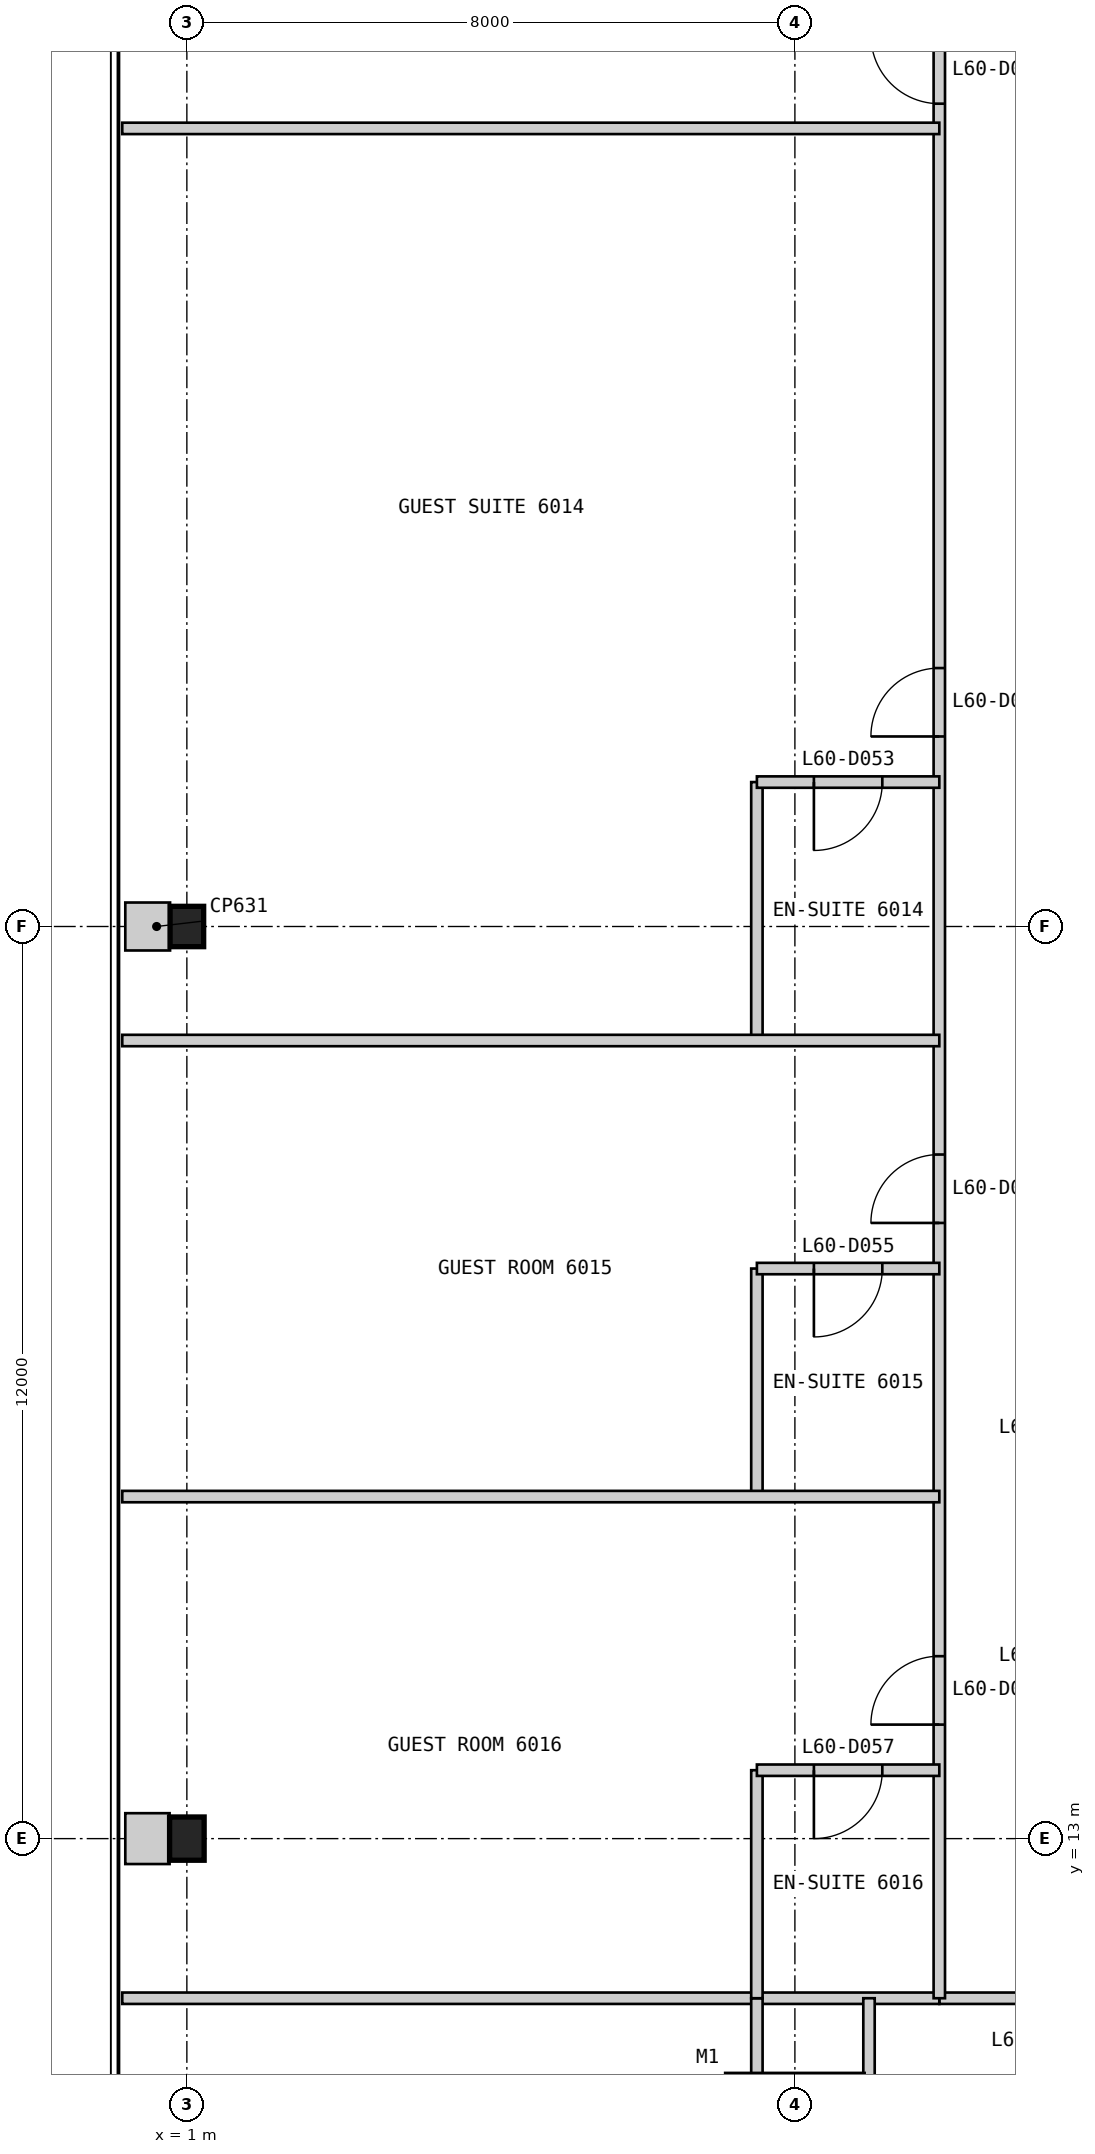
"""IFC4 building model, lengths in metres.
Left out: names, types, materials, properties, quantities, classifications, styles, units other than length and angle.
Written with IfcOpenShell. Run it as: python <this file> out.ifc"""

import sys

from ifc_helpers import new_model, si_unit, direction, frame, frame_2d, origin, origin_2d, place, context, subcontext, project, spatial, rectangle, i_section, extrude, element, fill, save


model = new_model("IFC4")
c1 = context("Model", 3, precision=1e-05, world=origin(), true_north=direction((0.0, 1.0)))
c2 = subcontext(c1, "Body", "Model", "MODEL_VIEW")
j1 = project(units=[si_unit("LENGTHUNIT", "METRE"), si_unit("PLANEANGLEUNIT", "RADIAN")], contexts=[c1])
p1 = place(None, origin())
s1 = spatial("IfcSite", under=j1, at=p1, CompositionType="ELEMENT")
p2 = place(p1, origin())
s2 = spatial("IfcBuilding", under=s1, at=p2, CompositionType="ELEMENT")
p3 = place(p2, frame((0.0, 0.0, 256.0)))
s3 = spatial("IfcBuildingStorey", under=s2, at=p3, CompositionType="ELEMENT", Elevation=256.0)
p4 = place(p3, frame((9.0, 9.0, 0.0), z_axis=(0.0, 0.0, 1.0), x_axis=(1.0, 0.0, 0.0)))
e1 = element("IfcColumn", 1, at=p4, inside=s3, PredefinedType="COLUMN", context=c2, shape_type="SweptSolid", body=[
    extrude(rectangle(XDim=1.8, YDim=1.8, at=origin_2d()), origin(), (0.0, 0.0, 1.0), 3.4),
])
p5 = place(p3, frame((1.0, 25.0, 0.0), z_axis=(0.0, 0.0, 1.0), x_axis=(1.0, 0.0, 0.0)))
e2 = element("IfcColumn", 2, at=p5, inside=s3, PredefinedType="COLUMN", context=c2, shape_type="SweptSolid", body=[
    extrude(i_section(OverallWidth=0.442, OverallDepth=0.531, WebThickness=0.066, FlangeThickness=0.106, at=origin_2d()), origin(), (0.0, 0.0, 1.0), 3.4),
])
p6 = place(p3, frame((1.0, 13.0, 0.0), z_axis=(0.0, 0.0, 1.0), x_axis=(1.0, 0.0, 0.0)))
e3 = element("IfcColumn", 3, at=p6, inside=s3, PredefinedType="COLUMN", context=c2, shape_type="SweptSolid", body=[
    extrude(i_section(OverallWidth=0.455, OverallDepth=0.569, WebThickness=0.078, FlangeThickness=0.125, at=origin_2d()), origin(), (0.0, 0.0, 1.0), 3.4),
])
p7 = place(p3, frame((10.9, 10.9, 0.0), z_axis=(0.0, 0.0, 1.0), x_axis=(1.0, 0.0, 0.0)))
e4 = element("IfcWall", 4, at=p7, inside=s3, PredefinedType="PARTITIONING", context=c2, shape_type="SweptSolid", body=[
    extrude(rectangle(XDim=28.2, YDim=0.15, at=frame_2d((14.1, 0.0))), origin(), (0.0, 0.0, 1.0), 3.25),
])
p8 = place(p7, frame((2.375, 0.0, 0.0)))
e5 = element("IfcOpeningElement", 5, at=p8, cuts=e4, PredefinedType="OPENING", context=c2, shape_type="SweptSolid", body=[
    extrude(rectangle(XDim=0.9, YDim=2.1, at=frame_2d((0.45, 1.05))), frame((0.0, 0.085, 0.0), z_axis=(0.0, -1.0, 0.0), x_axis=(1.0, 0.0, 0.0)), (0.0, 0.0, 1.0), 0.17),
])
p9 = place(p7, frame((10.7, 0.0, 0.0)))
e6 = element("IfcOpeningElement", 6, at=p9, cuts=e4, PredefinedType="OPENING", context=c2, shape_type="SweptSolid", body=[
    extrude(rectangle(XDim=0.9, YDim=2.1, at=frame_2d((0.45, 1.05))), frame((0.0, 0.085, 0.0), z_axis=(0.0, -1.0, 0.0), x_axis=(1.0, 0.0, 0.0)), (0.0, 0.0, 1.0), 0.17),
])
p10 = place(p7, frame((16.8, 0.0, 0.0)))
e7 = element("IfcOpeningElement", 7, at=p10, cuts=e4, PredefinedType="OPENING", context=c2, shape_type="SweptSolid", body=[
    extrude(rectangle(XDim=1.0, YDim=2.1, at=frame_2d((0.5, 1.05))), frame((0.0, 0.085, 0.0), z_axis=(0.0, -1.0, 0.0), x_axis=(1.0, 0.0, 0.0)), (0.0, 0.0, 1.0), 0.17),
])
p11 = place(p7, frame((23.7, 0.0, 0.0)))
e8 = element("IfcOpeningElement", 8, at=p11, cuts=e4, PredefinedType="OPENING", context=c2, shape_type="SweptSolid", body=[
    extrude(rectangle(XDim=0.9, YDim=2.1, at=frame_2d((0.45, 1.05))), frame((0.0, 0.085, 0.0), z_axis=(0.0, -1.0, 0.0), x_axis=(1.0, 0.0, 0.0)), (0.0, 0.0, 1.0), 0.17),
])
p12 = place(p3, frame((0.15, 10.9, 0.0), z_axis=(0.0, 0.0, 1.0), x_axis=(1.0, 0.0, 0.0)))
e9 = element("IfcWall", 9, at=p12, inside=s3, PredefinedType="PARTITIONING", context=c2, shape_type="SweptSolid", body=[
    extrude(rectangle(XDim=10.75, YDim=0.15, at=frame_2d((5.375, 0.0))), origin(), (0.0, 0.0, 1.0), 3.25),
])
p13 = place(p3, frame((9.975, 8.5, 0.0), z_axis=(0.0, 0.0, 1.0), x_axis=(0.0, 1.0, 0.0)))
e10 = element("IfcWall", 10, at=p13, inside=s3, PredefinedType="PARTITIONING", context=c2, shape_type="SweptSolid", body=[
    extrude(rectangle(XDim=2.4, YDim=0.15, at=frame_2d((1.2, 0.0))), origin(), (0.0, 0.0, 1.0), 3.25),
])
p14 = place(p3, frame((8.5, 0.15, 0.0), z_axis=(0.0, 0.0, 1.0), x_axis=(0.0, 1.0, 0.0)))
e11 = element("IfcWall", 11, at=p14, inside=s3, PredefinedType="PARTITIONING", context=c2, shape_type="SweptSolid", body=[
    extrude(rectangle(XDim=10.75, YDim=0.15, at=frame_2d((5.375, 0.0))), origin(), (0.0, 0.0, 1.0), 3.25),
])
p15 = place(p14, frame((5.0, 0.0, 0.0)))
e12 = element("IfcOpeningElement", 12, at=p15, cuts=e11, PredefinedType="OPENING", context=c2, shape_type="SweptSolid", body=[
    extrude(rectangle(XDim=0.9, YDim=2.1, at=frame_2d((0.45, 1.05))), frame((0.0, 0.085, 0.0), z_axis=(0.0, -1.0, 0.0), x_axis=(1.0, 0.0, 0.0)), (0.0, 0.0, 1.0), 0.17),
])
p16 = place(p3, frame((10.9, 39.1, 0.0), z_axis=(0.0, 0.0, 1.0), x_axis=(0.0, -1.0, 0.0)))
e13 = element("IfcWall", 13, at=p16, inside=s3, PredefinedType="PARTITIONING", context=c2, shape_type="SweptSolid", body=[
    extrude(rectangle(XDim=28.2, YDim=0.15, at=frame_2d((14.1, 0.0))), origin(), (0.0, 0.0, 1.0), 3.25),
])
p17 = place(p16, frame((2.375, 0.0, 0.0)))
e14 = element("IfcOpeningElement", 14, at=p17, cuts=e13, PredefinedType="OPENING", context=c2, shape_type="SweptSolid", body=[
    extrude(rectangle(XDim=0.9, YDim=2.1, at=frame_2d((0.45, 1.05))), frame((0.0, 0.085, 0.0), z_axis=(0.0, -1.0, 0.0), x_axis=(1.0, 0.0, 0.0)), (0.0, 0.0, 1.0), 0.17),
])
p18 = place(p16, frame((10.7, 0.0, 0.0)))
e15 = element("IfcOpeningElement", 15, at=p18, cuts=e13, PredefinedType="OPENING", context=c2, shape_type="SweptSolid", body=[
    extrude(rectangle(XDim=0.9, YDim=2.1, at=frame_2d((0.45, 1.05))), frame((0.0, 0.085, 0.0), z_axis=(0.0, -1.0, 0.0), x_axis=(1.0, 0.0, 0.0)), (0.0, 0.0, 1.0), 0.17),
])
p19 = place(p16, frame((17.1, 0.0, 0.0)))
e16 = element("IfcOpeningElement", 16, at=p19, cuts=e13, PredefinedType="OPENING", context=c2, shape_type="SweptSolid", body=[
    extrude(rectangle(XDim=0.9, YDim=2.1, at=frame_2d((0.45, 1.05))), frame((0.0, 0.085, 0.0), z_axis=(0.0, -1.0, 0.0), x_axis=(1.0, 0.0, 0.0)), (0.0, 0.0, 1.0), 0.17),
])
p20 = place(p16, frame((23.7, 0.0, 0.0)))
e17 = element("IfcOpeningElement", 17, at=p20, cuts=e13, PredefinedType="OPENING", context=c2, shape_type="SweptSolid", body=[
    extrude(rectangle(XDim=0.9, YDim=2.1, at=frame_2d((0.45, 1.05))), frame((0.0, 0.085, 0.0), z_axis=(0.0, -1.0, 0.0), x_axis=(1.0, 0.0, 0.0)), (0.0, 0.0, 1.0), 0.17),
])
p21 = place(p3, frame((0.15, 35.5, 0.0), z_axis=(0.0, 0.0, 1.0), x_axis=(1.0, 0.0, 0.0)))
e18 = element("IfcWall", 18, at=p21, inside=s3, PredefinedType="PARTITIONING", context=c2, shape_type="SweptSolid", body=[
    extrude(rectangle(XDim=10.75, YDim=0.15, at=frame_2d((5.375, 0.0))), origin(), (0.0, 0.0, 1.0), 3.25),
])
p22 = place(p3, frame((8.5, 26.9, 0.0), z_axis=(0.0, 0.0, 1.0), x_axis=(0.0, -1.0, 0.0)))
e19 = element("IfcWall", 19, at=p22, inside=s3, PredefinedType="PARTITIONING", context=c2, shape_type="SweptSolid", body=[
    extrude(rectangle(XDim=3.4, YDim=0.15, at=frame_2d((1.7, 0.0))), origin(), (0.0, 0.0, 1.0), 3.25),
])
p23 = place(p3, frame((8.5, 26.9, 0.0), z_axis=(0.0, 0.0, 1.0), x_axis=(1.0, 0.0, 0.0)))
e20 = element("IfcWall", 20, at=p23, inside=s3, PredefinedType="PARTITIONING", context=c2, shape_type="SweptSolid", body=[
    extrude(rectangle(XDim=2.4, YDim=0.15, at=frame_2d((1.2, 0.0))), origin(), (0.0, 0.0, 1.0), 3.25),
])
p24 = place(p23, frame((0.75, 0.0, 0.0)))
e21 = element("IfcOpeningElement", 21, at=p24, cuts=e20, PredefinedType="OPENING", context=c2, shape_type="SweptSolid", body=[
    extrude(rectangle(XDim=0.9, YDim=2.1, at=frame_2d((0.45, 1.05))), frame((0.0, 0.085, 0.0), z_axis=(0.0, -1.0, 0.0), x_axis=(1.0, 0.0, 0.0)), (0.0, 0.0, 1.0), 0.17),
])
p25 = place(p3, frame((0.15, 23.5, 0.0), z_axis=(0.0, 0.0, 1.0), x_axis=(1.0, 0.0, 0.0)))
e22 = element("IfcWall", 22, at=p25, inside=s3, PredefinedType="PARTITIONING", context=c2, shape_type="SweptSolid", body=[
    extrude(rectangle(XDim=10.75, YDim=0.15, at=frame_2d((5.375, 0.0))), origin(), (0.0, 0.0, 1.0), 3.25),
])
p26 = place(p3, frame((8.5, 20.5, 0.0), z_axis=(0.0, 0.0, 1.0), x_axis=(0.0, -1.0, 0.0)))
e23 = element("IfcWall", 23, at=p26, inside=s3, PredefinedType="PARTITIONING", context=c2, shape_type="SweptSolid", body=[
    extrude(rectangle(XDim=3.0, YDim=0.15, at=frame_2d((1.5, 0.0))), origin(), (0.0, 0.0, 1.0), 3.25),
])
p27 = place(p3, frame((8.5, 20.5, 0.0), z_axis=(0.0, 0.0, 1.0), x_axis=(1.0, 0.0, 0.0)))
e24 = element("IfcWall", 24, at=p27, inside=s3, PredefinedType="PARTITIONING", context=c2, shape_type="SweptSolid", body=[
    extrude(rectangle(XDim=2.4, YDim=0.15, at=frame_2d((1.2, 0.0))), origin(), (0.0, 0.0, 1.0), 3.25),
])
p28 = place(p27, frame((0.75, 0.0, 0.0)))
e25 = element("IfcOpeningElement", 25, at=p28, cuts=e24, PredefinedType="OPENING", context=c2, shape_type="SweptSolid", body=[
    extrude(rectangle(XDim=0.9, YDim=2.1, at=frame_2d((0.45, 1.05))), frame((0.0, 0.085, 0.0), z_axis=(0.0, -1.0, 0.0), x_axis=(1.0, 0.0, 0.0)), (0.0, 0.0, 1.0), 0.17),
])
p29 = place(p3, frame((0.15, 17.5, 0.0), z_axis=(0.0, 0.0, 1.0), x_axis=(1.0, 0.0, 0.0)))
e26 = element("IfcWall", 26, at=p29, inside=s3, PredefinedType="PARTITIONING", context=c2, shape_type="SweptSolid", body=[
    extrude(rectangle(XDim=10.75, YDim=0.15, at=frame_2d((5.375, 0.0))), origin(), (0.0, 0.0, 1.0), 3.25),
])
p30 = place(p3, frame((8.5, 13.9, 0.0), z_axis=(0.0, 0.0, 1.0), x_axis=(0.0, -1.0, 0.0)))
e27 = element("IfcWall", 27, at=p30, inside=s3, PredefinedType="PARTITIONING", context=c2, shape_type="SweptSolid", body=[
    extrude(rectangle(XDim=3.0, YDim=0.15, at=frame_2d((1.5, 0.0))), origin(), (0.0, 0.0, 1.0), 3.25),
])
p31 = place(p3, frame((8.5, 13.9, 0.0), z_axis=(0.0, 0.0, 1.0), x_axis=(1.0, 0.0, 0.0)))
e28 = element("IfcWall", 28, at=p31, inside=s3, PredefinedType="PARTITIONING", context=c2, shape_type="SweptSolid", body=[
    extrude(rectangle(XDim=2.4, YDim=0.15, at=frame_2d((1.2, 0.0))), origin(), (0.0, 0.0, 1.0), 3.25),
])
p32 = place(p31, frame((0.75, 0.0, 0.0)))
e29 = element("IfcOpeningElement", 29, at=p32, cuts=e28, PredefinedType="OPENING", context=c2, shape_type="SweptSolid", body=[
    extrude(rectangle(XDim=0.9, YDim=2.1, at=frame_2d((0.45, 1.05))), frame((0.0, 0.085, 0.0), z_axis=(0.0, -1.0, 0.0), x_axis=(1.0, 0.0, 0.0)), (0.0, 0.0, 1.0), 0.17),
])
p33 = place(p3, frame((0.19, 25.0, 0.0), z_axis=(0.0, 0.0, 1.0), x_axis=(1.0, 0.0, 0.0)))
e30 = element("IfcWall", 30, at=p33, inside=s3, PredefinedType="PARTITIONING", context=c2, shape_type="SweptSolid", body=[
    extrude(rectangle(XDim=0.589, YDim=0.631, at=frame_2d((0.294, 0.0))), origin(), (0.0, 0.0, 1.0), 3.25),
])
p34 = place(p3, frame((0.19, 13.0, 0.0), z_axis=(0.0, 0.0, 1.0), x_axis=(1.0, 0.0, 0.0)))
e31 = element("IfcWall", 31, at=p34, inside=s3, PredefinedType="PARTITIONING", context=c2, shape_type="SweptSolid", body=[
    extrude(rectangle(XDim=0.583, YDim=0.669, at=frame_2d((0.292, 0.0))), origin(), (0.0, 0.0, 1.0), 3.25),
])
p35 = place(p17, frame((0.9, 0.0, 0.0), z_axis=(0.0, 0.0, 1.0), x_axis=(-1.0, 0.0, 0.0)))
e32 = element("IfcDoor", 32, at=p35, inside=s3, OperationType="SINGLE_SWING_RIGHT", PredefinedType="DOOR", context=c2, shape_type="SweptSolid", body=[
    extrude(rectangle(XDim=0.9, YDim=2.1, at=frame_2d((0.45, 1.05))), frame((0.0, 0.025, 0.0), z_axis=(0.0, -1.0, 0.0), x_axis=(1.0, 0.0, 0.0)), (0.0, 0.0, 1.0), 0.05),
])
fill(e14, e32)
p36 = place(p24, frame((0.9, 0.0, 0.0), z_axis=(0.0, 0.0, 1.0), x_axis=(-1.0, 0.0, 0.0)))
e33 = element("IfcDoor", 33, at=p36, inside=s3, OperationType="SINGLE_SWING_RIGHT", PredefinedType="DOOR", context=c2, shape_type="SweptSolid", body=[
    extrude(rectangle(XDim=0.9, YDim=2.1, at=frame_2d((0.45, 1.05))), frame((0.0, 0.025, 0.0), z_axis=(0.0, -1.0, 0.0), x_axis=(1.0, 0.0, 0.0)), (0.0, 0.0, 1.0), 0.05),
])
fill(e21, e33)
p37 = place(p18, frame((0.9, 0.0, 0.0), z_axis=(0.0, 0.0, 1.0), x_axis=(-1.0, 0.0, 0.0)))
e34 = element("IfcDoor", 34, at=p37, inside=s3, OperationType="SINGLE_SWING_LEFT", PredefinedType="DOOR", context=c2, shape_type="SweptSolid", body=[
    extrude(rectangle(XDim=0.9, YDim=2.1, at=frame_2d((0.45, 1.05))), frame((0.0, 0.025, 0.0), z_axis=(0.0, -1.0, 0.0), x_axis=(1.0, 0.0, 0.0)), (0.0, 0.0, 1.0), 0.05),
])
fill(e15, e34)
p38 = place(p28, frame((0.9, 0.0, 0.0), z_axis=(0.0, 0.0, 1.0), x_axis=(-1.0, 0.0, 0.0)))
e35 = element("IfcDoor", 35, at=p38, inside=s3, OperationType="SINGLE_SWING_RIGHT", PredefinedType="DOOR", context=c2, shape_type="SweptSolid", body=[
    extrude(rectangle(XDim=0.9, YDim=2.1, at=frame_2d((0.45, 1.05))), frame((0.0, 0.025, 0.0), z_axis=(0.0, -1.0, 0.0), x_axis=(1.0, 0.0, 0.0)), (0.0, 0.0, 1.0), 0.05),
])
fill(e25, e35)
p39 = place(p19, frame((0.9, 0.0, 0.0), z_axis=(0.0, 0.0, 1.0), x_axis=(-1.0, 0.0, 0.0)))
e36 = element("IfcDoor", 36, at=p39, inside=s3, OperationType="SINGLE_SWING_LEFT", PredefinedType="DOOR", context=c2, shape_type="SweptSolid", body=[
    extrude(rectangle(XDim=0.9, YDim=2.1, at=frame_2d((0.45, 1.05))), frame((0.0, 0.025, 0.0), z_axis=(0.0, -1.0, 0.0), x_axis=(1.0, 0.0, 0.0)), (0.0, 0.0, 1.0), 0.05),
])
fill(e16, e36)
p40 = place(p32, frame((0.9, 0.0, 0.0), z_axis=(0.0, 0.0, 1.0), x_axis=(-1.0, 0.0, 0.0)))
e37 = element("IfcDoor", 37, at=p40, inside=s3, OperationType="SINGLE_SWING_RIGHT", PredefinedType="DOOR", context=c2, shape_type="SweptSolid", body=[
    extrude(rectangle(XDim=0.9, YDim=2.1, at=frame_2d((0.45, 1.05))), frame((0.0, 0.025, 0.0), z_axis=(0.0, -1.0, 0.0), x_axis=(1.0, 0.0, 0.0)), (0.0, 0.0, 1.0), 0.05),
])
fill(e29, e37)
p41 = place(p20, frame((0.9, 0.0, 0.0), z_axis=(0.0, 0.0, 1.0), x_axis=(-1.0, 0.0, 0.0)))
e38 = element("IfcDoor", 38, at=p41, inside=s3, OperationType="SINGLE_SWING_LEFT", PredefinedType="DOOR", context=c2, shape_type="SweptSolid", body=[
    extrude(rectangle(XDim=0.9, YDim=2.1, at=frame_2d((0.45, 1.05))), frame((0.0, 0.025, 0.0), z_axis=(0.0, -1.0, 0.0), x_axis=(1.0, 0.0, 0.0)), (0.0, 0.0, 1.0), 0.05),
])
fill(e17, e38)
save(model, sys.argv[1])
